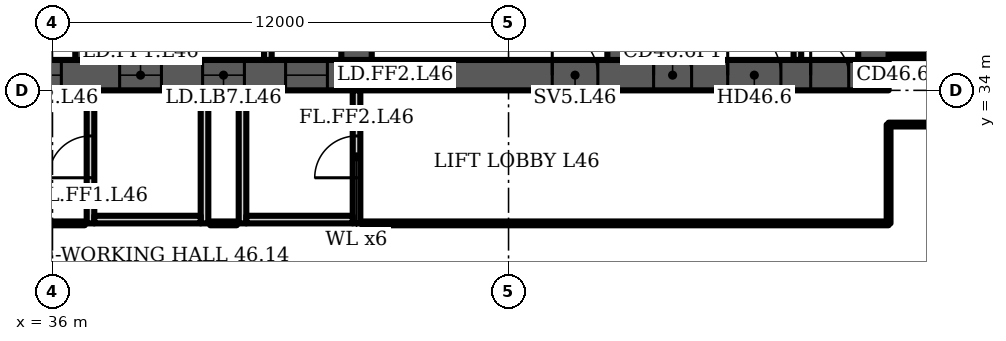
"""IFC4 building model, lengths in metres.
Left out: names, types, materials, properties, quantities, classifications, styles, units other than length and angle.
Written with IfcOpenShell. Run it as: python <this file> out.ifc"""

import sys

from ifc_helpers import new_model, si_unit, direction, frame, frame_2d, origin, place, context, subcontext, project, spatial, polyline, rectangle, outline, extrude, element, fill, save


model = new_model("IFC4")
c1 = context("Model", 3, precision=1e-05, world=origin(), true_north=direction((0.0, 1.0)))
c2 = subcontext(c1, "Body", "Model", "MODEL_VIEW")
j1 = project(units=[si_unit("LENGTHUNIT", "METRE"), si_unit("PLANEANGLEUNIT", "RADIAN")], contexts=[c1])
p1 = place(None, origin())
s1 = spatial("IfcSite", under=j1, at=p1, CompositionType="ELEMENT")
p2 = place(p1, origin())
s2 = spatial("IfcBuilding", under=s1, at=p2, CompositionType="ELEMENT")
p3 = place(p2, frame((0.0, 0.0, 187.9)))
s3 = spatial("IfcBuildingStorey", under=s2, at=p3, CompositionType="ELEMENT", Elevation=187.9)
p4 = place(p3, frame((16.0, 34.4, 0.0), z_axis=(0.0, 0.0, 1.0), x_axis=(1.0, 0.0, 0.0)))
e1 = element("IfcWall", 1, at=p4, inside=s3, PredefinedType="SHEAR", context=c2, shape_type="SweptSolid", body=[
    extrude(rectangle(XDim=42.0, YDim=0.8, at=frame_2d((21.0, 0.0))), origin(), (0.0, 0.0, 1.0), 3.6),
])
p5 = place(p4, frame((3.2, 0.0, 0.0)))
e2 = element("IfcOpeningElement", 2, at=p5, cuts=e1, PredefinedType="OPENING", context=c2, shape_type="SweptSolid", body=[
    extrude(rectangle(XDim=1.0, YDim=2.1, at=frame_2d((0.5, 1.05))), frame((0.0, 0.41, 0.0), z_axis=(0.0, -1.0, 0.0), x_axis=(1.0, 0.0, 0.0)), (0.0, 0.0, 1.0), 0.82),
])
p6 = place(p4, frame((7.65, 0.0, 0.0)))
e3 = element("IfcOpeningElement", 3, at=p6, cuts=e1, PredefinedType="OPENING", context=c2, shape_type="SweptSolid", body=[
    extrude(rectangle(XDim=1.2, YDim=2.1, at=frame_2d((0.6, 1.05))), frame((0.0, 0.41, 0.0), z_axis=(0.0, -1.0, 0.0), x_axis=(1.0, 0.0, 0.0)), (0.0, 0.0, 1.0), 0.82),
])
p7 = place(p4, frame((14.767, 0.0, 0.0)))
e4 = element("IfcOpeningElement", 4, at=p7, cuts=e1, PredefinedType="OPENING", context=c2, shape_type="SweptSolid", body=[
    extrude(rectangle(XDim=1.1, YDim=2.1, at=frame_2d((0.55, 1.05))), frame((0.0, 0.41, 0.0), z_axis=(0.0, -1.0, 0.0), x_axis=(1.0, 0.0, 0.0)), (0.0, 0.0, 1.0), 0.82),
])
p8 = place(p4, frame((19.133, 0.0, 0.0)))
e5 = element("IfcOpeningElement", 5, at=p8, cuts=e1, PredefinedType="OPENING", context=c2, shape_type="SweptSolid", body=[
    extrude(rectangle(XDim=1.1, YDim=2.1, at=frame_2d((0.55, 1.05))), frame((0.0, 0.41, 0.0), z_axis=(0.0, -1.0, 0.0), x_axis=(1.0, 0.0, 0.0)), (0.0, 0.0, 1.0), 0.82),
])
p9 = place(p4, frame((16.8, 0.0, 0.0)))
e6 = element("IfcOpeningElement", 6, at=p9, cuts=e1, PredefinedType="OPENING", context=c2, shape_type="SweptSolid", body=[
    extrude(rectangle(XDim=1.4, YDim=2.1, at=frame_2d((0.7, 1.05))), frame((0.0, 0.41, 0.0), z_axis=(0.0, -1.0, 0.0), x_axis=(1.0, 0.0, 0.0)), (0.0, 0.0, 1.0), 0.82),
])
p10 = place(p4, frame((21.767, 0.0, 0.0)))
e7 = element("IfcOpeningElement", 7, at=p10, cuts=e1, PredefinedType="OPENING", context=c2, shape_type="SweptSolid", body=[
    extrude(rectangle(XDim=1.1, YDim=2.1, at=frame_2d((0.55, 1.05))), frame((0.0, 0.41, 0.0), z_axis=(0.0, -1.0, 0.0), x_axis=(1.0, 0.0, 0.0)), (0.0, 0.0, 1.0), 0.82),
])
p11 = place(p4, frame((23.95, 0.0, 0.0)))
e8 = element("IfcOpeningElement", 8, at=p11, cuts=e1, PredefinedType="OPENING", context=c2, shape_type="SweptSolid", body=[
    extrude(rectangle(XDim=1.1, YDim=2.1, at=frame_2d((0.55, 1.05))), frame((0.0, 0.41, 0.0), z_axis=(0.0, -1.0, 0.0), x_axis=(1.0, 0.0, 0.0)), (0.0, 0.0, 1.0), 0.82),
])
p12 = place(p4, frame((26.133, 0.0, 0.0)))
e9 = element("IfcOpeningElement", 9, at=p12, cuts=e1, PredefinedType="OPENING", context=c2, shape_type="SweptSolid", body=[
    extrude(rectangle(XDim=1.1, YDim=2.1, at=frame_2d((0.55, 1.05))), frame((0.0, 0.41, 0.0), z_axis=(0.0, -1.0, 0.0), x_axis=(1.0, 0.0, 0.0)), (0.0, 0.0, 1.0), 0.82),
])
p13 = place(p4, frame((33.15, 0.0, 0.0)))
e10 = element("IfcOpeningElement", 10, at=p13, cuts=e1, PredefinedType="OPENING", context=c2, shape_type="SweptSolid", body=[
    extrude(rectangle(XDim=1.2, YDim=2.1, at=frame_2d((0.6, 1.05))), frame((0.0, 0.41, 0.0), z_axis=(0.0, -1.0, 0.0), x_axis=(1.0, 0.0, 0.0)), (0.0, 0.0, 1.0), 0.82),
])
p14 = place(p4, frame((35.817, 0.0, 0.0)))
e11 = element("IfcOpeningElement", 11, at=p14, cuts=e1, PredefinedType="OPENING", context=c2, shape_type="SweptSolid", body=[
    extrude(rectangle(XDim=1.0, YDim=2.1, at=frame_2d((0.5, 1.05))), frame((0.0, 0.41, 0.0), z_axis=(0.0, -1.0, 0.0), x_axis=(1.0, 0.0, 0.0)), (0.0, 0.0, 1.0), 0.82),
])
p15 = place(p4, frame((39.95, 0.0, 0.0)))
e12 = element("IfcOpeningElement", 12, at=p15, cuts=e1, PredefinedType="OPENING", context=c2, shape_type="SweptSolid", body=[
    extrude(rectangle(XDim=1.0, YDim=2.1, at=frame_2d((0.5, 1.05))), frame((0.0, 0.41, 0.0), z_axis=(0.0, -1.0, 0.0), x_axis=(1.0, 0.0, 0.0)), (0.0, 0.0, 1.0), 0.82),
])
p16 = place(p4, frame((37.767, 0.0, 0.0)))
e13 = element("IfcOpeningElement", 13, at=p16, cuts=e1, PredefinedType="OPENING", context=c2, shape_type="SweptSolid", body=[
    extrude(rectangle(XDim=1.4, YDim=2.1, at=frame_2d((0.7, 1.05))), frame((0.0, 0.41, 0.0), z_axis=(0.0, -1.0, 0.0), x_axis=(1.0, 0.0, 0.0)), (0.0, 0.0, 1.0), 0.82),
])
p17 = place(p3, frame((37.0, 34.8, 0.0), z_axis=(0.0, 0.0, 1.0), x_axis=(0.0, 1.0, 0.0)))
e14 = element("IfcWall", 14, at=p17, inside=s3, PredefinedType="SHEAR", context=c2, shape_type="SweptSolid", body=[
    extrude(rectangle(XDim=14.987, YDim=0.8, at=frame_2d((7.493, 0.0))), origin(), (0.0, 0.0, 1.0), 3.6),
])
p18 = place(p17, frame((11.312, 0.0, 0.0)))
e15 = element("IfcOpeningElement", 15, at=p18, cuts=e14, PredefinedType="OPENING", context=c2, shape_type="SweptSolid", body=[
    extrude(rectangle(XDim=1.0, YDim=2.1, at=frame_2d((0.5, 1.05))), frame((0.0, 0.41, 0.0), z_axis=(0.0, -1.0, 0.0), x_axis=(1.0, 0.0, 0.0)), (0.0, 0.0, 1.0), 0.82),
])
p19 = place(p17, frame((3.6, 0.0, 0.0)))
e16 = element("IfcOpeningElement", 16, at=p19, cuts=e14, PredefinedType="OPENING", context=c2, shape_type="SweptSolid", body=[
    extrude(rectangle(XDim=1.1, YDim=2.1, at=frame_2d((0.55, 1.05))), frame((0.0, 0.41, 0.0), z_axis=(0.0, -1.0, 0.0), x_axis=(1.0, 0.0, 0.0)), (0.0, 0.0, 1.0), 0.82),
])
p20 = place(p3, frame((44.0, 34.8, 0.0), z_axis=(0.0, 0.0, 1.0), x_axis=(0.0, 1.0, 0.0)))
e17 = element("IfcWall", 17, at=p20, inside=s3, PredefinedType="SHEAR", context=c2, shape_type="SweptSolid", body=[
    extrude(rectangle(XDim=14.374, YDim=0.8, at=frame_2d((7.187, 0.0))), origin(), (0.0, 0.0, 1.0), 3.6),
])
p21 = place(p20, frame((11.312, 0.0, 0.0)))
e18 = element("IfcOpeningElement", 18, at=p21, cuts=e17, PredefinedType="OPENING", context=c2, shape_type="SweptSolid", body=[
    extrude(rectangle(XDim=1.0, YDim=2.1, at=frame_2d((0.5, 1.05))), frame((0.0, 0.41, 0.0), z_axis=(0.0, -1.0, 0.0), x_axis=(1.0, 0.0, 0.0)), (0.0, 0.0, 1.0), 0.82),
])
p22 = place(p20, frame((3.6, 0.0, 0.0)))
e19 = element("IfcOpeningElement", 19, at=p22, cuts=e17, PredefinedType="OPENING", context=c2, shape_type="SweptSolid", body=[
    extrude(rectangle(XDim=1.1, YDim=2.1, at=frame_2d((0.55, 1.05))), frame((0.0, 0.41, 0.0), z_axis=(0.0, -1.0, 0.0), x_axis=(1.0, 0.0, 0.0)), (0.0, 0.0, 1.0), 0.82),
])
p23 = place(p3, frame((51.0, 34.8, 0.0), z_axis=(0.0, 0.0, 1.0), x_axis=(0.0, 1.0, 0.0)))
e20 = element("IfcWall", 20, at=p23, inside=s3, PredefinedType="SHEAR", context=c2, shape_type="SweptSolid", body=[
    extrude(rectangle(XDim=13.762, YDim=0.8, at=frame_2d((6.881, 0.0))), origin(), (0.0, 0.0, 1.0), 3.6),
])
p24 = place(p23, frame((3.6, 0.0, 0.0)))
e21 = element("IfcOpeningElement", 21, at=p24, cuts=e20, PredefinedType="OPENING", context=c2, shape_type="SweptSolid", body=[
    extrude(rectangle(XDim=1.1, YDim=2.1, at=frame_2d((0.55, 1.05))), frame((0.0, 0.41, 0.0), z_axis=(0.0, -1.0, 0.0), x_axis=(1.0, 0.0, 0.0)), (0.0, 0.0, 1.0), 0.82),
])
p25 = place(p3, frame((57.6, 34.8, 0.0), z_axis=(0.0, 0.0, 1.0), x_axis=(0.0, 1.0, 0.0)))
e22 = element("IfcWall", 22, at=p25, inside=s3, PredefinedType="SHEAR", context=c2, shape_type="SweptSolid", body=[
    extrude(rectangle(XDim=13.184, YDim=0.8, at=frame_2d((6.592, 0.0))), origin(), (0.0, 0.0, 1.0), 3.6),
])
p26 = place(p3, origin())
e23 = element("IfcWall", 23, at=p26, inside=s3, PredefinedType="PARTITIONING", context=c2, shape_type="SweptSolid", body=[
    extrude(outline(polyline([(34.567, 37.85), (34.767, 37.85), (36.6, 37.85), (36.6, 37.65), (34.767, 37.65), (34.767, 34.8), (34.567, 34.8), (34.567, 37.85)])), origin(), (0.0, 0.0, 1.0), 3.2),
])
p27 = place(p3, origin())
e24 = element("IfcWall", 24, at=p27, inside=s3, PredefinedType="PARTITIONING", context=c2, shape_type="SweptSolid", body=[
    extrude(outline(polyline([(41.567, 37.1), (39.433, 37.1), (39.433, 34.8), (39.233, 34.8), (39.233, 37.65), (37.4, 37.65), (37.4, 37.85), (39.233, 37.85), (39.433, 37.85), (39.433, 37.3), (41.567, 37.3), (41.567, 37.55), (41.767, 37.55), (43.6, 37.55), (43.6, 37.35), (41.767, 37.35), (41.767, 34.8), (41.567, 34.8), (41.567, 37.1)])), origin(), (0.0, 0.0, 1.0), 3.2),
])
p28 = place(p3, origin())
e25 = element("IfcWall", 25, at=p28, inside=s3, PredefinedType="PARTITIONING", context=c2, shape_type="SweptSolid", body=[
    extrude(outline(polyline([(53.233, 34.8), (53.233, 37.3), (53.433, 37.3), (53.433, 34.8), (53.233, 34.8)])), origin(), (0.0, 0.0, 1.0), 3.2),
])
p29 = place(p3, origin())
e26 = element("IfcWall", 26, at=p29, inside=s3, PredefinedType="PARTITIONING", context=c2, shape_type="SweptSolid", body=[
    extrude(outline(polyline([(55.5, 34.8), (55.5, 37.3), (55.7, 37.3), (55.7, 34.8), (55.5, 34.8)])), origin(), (0.0, 0.0, 1.0), 3.2),
])
p30 = place(p3, frame((37.0, 30.5, 0.0), z_axis=(0.0, 0.0, 1.0), x_axis=(0.0, 1.0, 0.0)))
e27 = element("IfcWall", 27, at=p30, inside=s3, PredefinedType="PARTITIONING", context=c2, shape_type="SweptSolid", body=[
    extrude(rectangle(XDim=3.5, YDim=0.2, at=frame_2d((1.75, 0.0))), origin(), (0.0, 0.0, 1.0), 3.2),
])
p31 = place(p30, frame((1.2, 0.0, 0.0)))
e28 = element("IfcOpeningElement", 28, at=p31, cuts=e27, PredefinedType="OPENING", context=c2, shape_type="SweptSolid", body=[
    extrude(rectangle(XDim=1.1, YDim=2.1, at=frame_2d((0.55, 1.05))), frame((0.0, 0.11, 0.0), z_axis=(0.0, -1.0, 0.0), x_axis=(1.0, 0.0, 0.0)), (0.0, 0.0, 1.0), 0.22),
])
p32 = place(p3, frame((40.0, 30.5, 0.0), z_axis=(0.0, 0.0, 1.0), x_axis=(0.0, 1.0, 0.0)))
e29 = element("IfcWall", 29, at=p32, inside=s3, PredefinedType="PARTITIONING", context=c2, shape_type="SweptSolid", body=[
    extrude(rectangle(XDim=3.5, YDim=0.2, at=frame_2d((1.75, 0.0))), origin(), (0.0, 0.0, 1.0), 3.2),
])
p33 = place(p3, frame((37.1, 30.6, 0.0), z_axis=(0.0, 0.0, 1.0), x_axis=(1.0, 0.0, 0.0)))
e30 = element("IfcWall", 30, at=p33, inside=s3, PredefinedType="PARTITIONING", context=c2, shape_type="SweptSolid", body=[
    extrude(rectangle(XDim=2.8, YDim=0.2, at=frame_2d((1.4, 0.0))), origin(), (0.0, 0.0, 1.0), 3.2),
])
p34 = place(p3, frame((41.0, 30.5, 0.0), z_axis=(0.0, 0.0, 1.0), x_axis=(0.0, 1.0, 0.0)))
e31 = element("IfcWall", 31, at=p34, inside=s3, PredefinedType="PARTITIONING", context=c2, shape_type="SweptSolid", body=[
    extrude(rectangle(XDim=3.5, YDim=0.2, at=frame_2d((1.75, 0.0))), origin(), (0.0, 0.0, 1.0), 3.2),
])
p35 = place(p3, frame((44.0, 30.5, 0.0), z_axis=(0.0, 0.0, 1.0), x_axis=(0.0, 1.0, 0.0)))
e32 = element("IfcWall", 32, at=p35, inside=s3, PredefinedType="PARTITIONING", context=c2, shape_type="SweptSolid", body=[
    extrude(rectangle(XDim=3.5, YDim=0.2, at=frame_2d((1.75, 0.0))), origin(), (0.0, 0.0, 1.0), 3.2),
])
p36 = place(p35, frame((1.2, 0.0, 0.0)))
e33 = element("IfcOpeningElement", 33, at=p36, cuts=e32, PredefinedType="OPENING", context=c2, shape_type="SweptSolid", body=[
    extrude(rectangle(XDim=1.1, YDim=2.1, at=frame_2d((0.55, 1.05))), frame((0.0, 0.11, 0.0), z_axis=(0.0, -1.0, 0.0), x_axis=(1.0, 0.0, 0.0)), (0.0, 0.0, 1.0), 0.22),
])
p37 = place(p3, frame((41.1, 30.6, 0.0), z_axis=(0.0, 0.0, 1.0), x_axis=(1.0, 0.0, 0.0)))
e34 = element("IfcWall", 34, at=p37, inside=s3, PredefinedType="PARTITIONING", context=c2, shape_type="SweptSolid", body=[
    extrude(rectangle(XDim=2.8, YDim=0.2, at=frame_2d((1.4, 0.0))), origin(), (0.0, 0.0, 1.0), 3.2),
])
p38 = place(p3, frame((16.0, 30.5, 0.0), z_axis=(0.0, 0.0, 1.0), x_axis=(1.0, 0.0, 0.0)))
e35 = element("IfcWall", 35, at=p38, inside=s3, PredefinedType="PARTITIONING", context=c2, shape_type="SweptSolid", body=[
    extrude(rectangle(XDim=20.85, YDim=0.1, at=frame_2d((10.425, 0.0))), origin(), (0.0, 0.0, 1.0), 3.2),
])
p39 = place(p3, frame((58.0, 30.5, 0.0), z_axis=(0.0, 0.0, 1.0), x_axis=(0.0, 1.0, 0.0)))
e36 = element("IfcWall", 36, at=p39, inside=s3, PredefinedType="PARTITIONING", context=c2, shape_type="SweptSolid", body=[
    extrude(rectangle(XDim=2.6, YDim=0.1, at=frame_2d((1.3, 0.0))), origin(), (0.0, 0.0, 1.0), 3.2),
])
p40 = place(p3, frame((58.0, 33.1, 0.0), z_axis=(0.0, 0.0, 1.0), x_axis=(1.0, 0.0, 0.0)))
e37 = element("IfcWall", 37, at=p40, inside=s3, PredefinedType="PARTITIONING", context=c2, shape_type="SweptSolid", body=[
    extrude(rectangle(XDim=1.5, YDim=0.1, at=frame_2d((0.75, 0.0))), origin(), (0.0, 0.0, 1.0), 3.2),
])
p41 = place(p3, frame((58.02, 34.9, 0.0), z_axis=(0.0, 0.0, 1.0), x_axis=(1.0, 0.0, 0.0)))
e38 = element("IfcWall", 38, at=p41, inside=s3, PredefinedType="PARTITIONING", context=c2, shape_type="SweptSolid", body=[
    extrude(rectangle(XDim=1.48, YDim=0.1, at=frame_2d((0.74, 0.0))), origin(), (0.0, 0.0, 1.0), 3.2),
])
p42 = place(p3, frame((40.15, 30.5, 0.0), z_axis=(0.0, 0.0, 1.0), x_axis=(1.0, 0.0, 0.0)))
e39 = element("IfcWall", 39, at=p42, inside=s3, PredefinedType="PARTITIONING", context=c2, shape_type="SweptSolid", body=[
    extrude(rectangle(XDim=0.7, YDim=0.1, at=frame_2d((0.35, 0.0))), origin(), (0.0, 0.0, 1.0), 3.2),
])
p43 = place(p3, frame((44.15, 30.5, 0.0), z_axis=(0.0, 0.0, 1.0), x_axis=(1.0, 0.0, 0.0)))
e40 = element("IfcWall", 40, at=p43, inside=s3, PredefinedType="PARTITIONING", context=c2, shape_type="SweptSolid", body=[
    extrude(rectangle(XDim=13.85, YDim=0.1, at=frame_2d((6.925, 0.0))), origin(), (0.0, 0.0, 1.0), 3.2),
])
p44 = place(p8, origin())
e41 = element("IfcDoor", 41, at=p44, inside=s3, OperationType="DOUBLE_DOOR_SLIDING", PredefinedType="DOOR", context=c2, shape_type="SweptSolid", body=[
    extrude(rectangle(XDim=1.1, YDim=2.1, at=frame_2d((0.55, 1.05))), frame((0.0, 0.025, 0.0), z_axis=(0.0, -1.0, 0.0), x_axis=(1.0, 0.0, 0.0)), (0.0, 0.0, 1.0), 0.05),
])
fill(e5, e41)
p45 = place(p10, origin())
e42 = element("IfcDoor", 42, at=p45, inside=s3, OperationType="DOUBLE_DOOR_SLIDING", PredefinedType="DOOR", context=c2, shape_type="SweptSolid", body=[
    extrude(rectangle(XDim=1.1, YDim=2.1, at=frame_2d((0.55, 1.05))), frame((0.0, 0.025, 0.0), z_axis=(0.0, -1.0, 0.0), x_axis=(1.0, 0.0, 0.0)), (0.0, 0.0, 1.0), 0.05),
])
fill(e7, e42)
p46 = place(p11, origin())
e43 = element("IfcDoor", 43, at=p46, inside=s3, OperationType="DOUBLE_DOOR_SLIDING", PredefinedType="DOOR", context=c2, shape_type="SweptSolid", body=[
    extrude(rectangle(XDim=1.1, YDim=2.1, at=frame_2d((0.55, 1.05))), frame((0.0, 0.025, 0.0), z_axis=(0.0, -1.0, 0.0), x_axis=(1.0, 0.0, 0.0)), (0.0, 0.0, 1.0), 0.05),
])
fill(e8, e43)
p47 = place(p12, origin())
e44 = element("IfcDoor", 44, at=p47, inside=s3, OperationType="DOUBLE_DOOR_SLIDING", PredefinedType="DOOR", context=c2, shape_type="SweptSolid", body=[
    extrude(rectangle(XDim=1.1, YDim=2.1, at=frame_2d((0.55, 1.05))), frame((0.0, 0.025, 0.0), z_axis=(0.0, -1.0, 0.0), x_axis=(1.0, 0.0, 0.0)), (0.0, 0.0, 1.0), 0.05),
])
fill(e9, e44)
p48 = place(p13, origin())
e45 = element("IfcDoor", 45, at=p48, inside=s3, OperationType="SINGLE_SWING_LEFT", PredefinedType="DOOR", context=c2, shape_type="SweptSolid", body=[
    extrude(rectangle(XDim=1.2, YDim=2.1, at=frame_2d((0.6, 1.05))), frame((0.0, 0.025, 0.0), z_axis=(0.0, -1.0, 0.0), x_axis=(1.0, 0.0, 0.0)), (0.0, 0.0, 1.0), 0.05),
])
fill(e10, e45)
p49 = place(p14, origin())
e46 = element("IfcDoor", 46, at=p49, inside=s3, OperationType="SINGLE_SWING_LEFT", PredefinedType="DOOR", context=c2, shape_type="SweptSolid", body=[
    extrude(rectangle(XDim=1.0, YDim=2.1, at=frame_2d((0.5, 1.05))), frame((0.0, 0.4, 0.0), z_axis=(0.0, -1.0, 0.0), x_axis=(1.0, 0.0, 0.0)), (0.0, 0.0, 1.0), 0.8),
])
fill(e11, e46)
p50 = place(p15, origin())
e47 = element("IfcDoor", 47, at=p50, inside=s3, OperationType="SINGLE_SWING_LEFT", PredefinedType="DOOR", context=c2, shape_type="SweptSolid", body=[
    extrude(rectangle(XDim=1.0, YDim=2.1, at=frame_2d((0.5, 1.05))), frame((0.0, 0.4, 0.0), z_axis=(0.0, -1.0, 0.0), x_axis=(1.0, 0.0, 0.0)), (0.0, 0.0, 1.0), 0.8),
])
fill(e12, e47)
p51 = place(p16, origin())
e48 = element("IfcDoor", 48, at=p51, inside=s3, OperationType="DOUBLE_DOOR_SINGLE_SWING", PredefinedType="DOOR", context=c2, shape_type="SweptSolid", body=[
    extrude(rectangle(XDim=1.4, YDim=2.1, at=frame_2d((0.7, 1.05))), frame((0.0, 0.025, 0.0), z_axis=(0.0, -1.0, 0.0), x_axis=(1.0, 0.0, 0.0)), (0.0, 0.0, 1.0), 0.05),
])
fill(e13, e48)
p52 = place(p31, origin())
e49 = element("IfcDoor", 49, at=p52, inside=s3, OperationType="SINGLE_SWING_LEFT", PredefinedType="DOOR", context=c2, shape_type="SweptSolid", body=[
    extrude(rectangle(XDim=1.1, YDim=2.1, at=frame_2d((0.55, 1.05))), frame((0.0, 0.025, 0.0), z_axis=(0.0, -1.0, 0.0), x_axis=(1.0, 0.0, 0.0)), (0.0, 0.0, 1.0), 0.05),
])
fill(e28, e49)
p53 = place(p36, origin())
e50 = element("IfcDoor", 50, at=p53, inside=s3, OperationType="SINGLE_SWING_LEFT", PredefinedType="DOOR", context=c2, shape_type="SweptSolid", body=[
    extrude(rectangle(XDim=1.1, YDim=2.1, at=frame_2d((0.55, 1.05))), frame((0.0, 0.025, 0.0), z_axis=(0.0, -1.0, 0.0), x_axis=(1.0, 0.0, 0.0)), (0.0, 0.0, 1.0), 0.05),
])
fill(e33, e50)
save(model, sys.argv[1])
